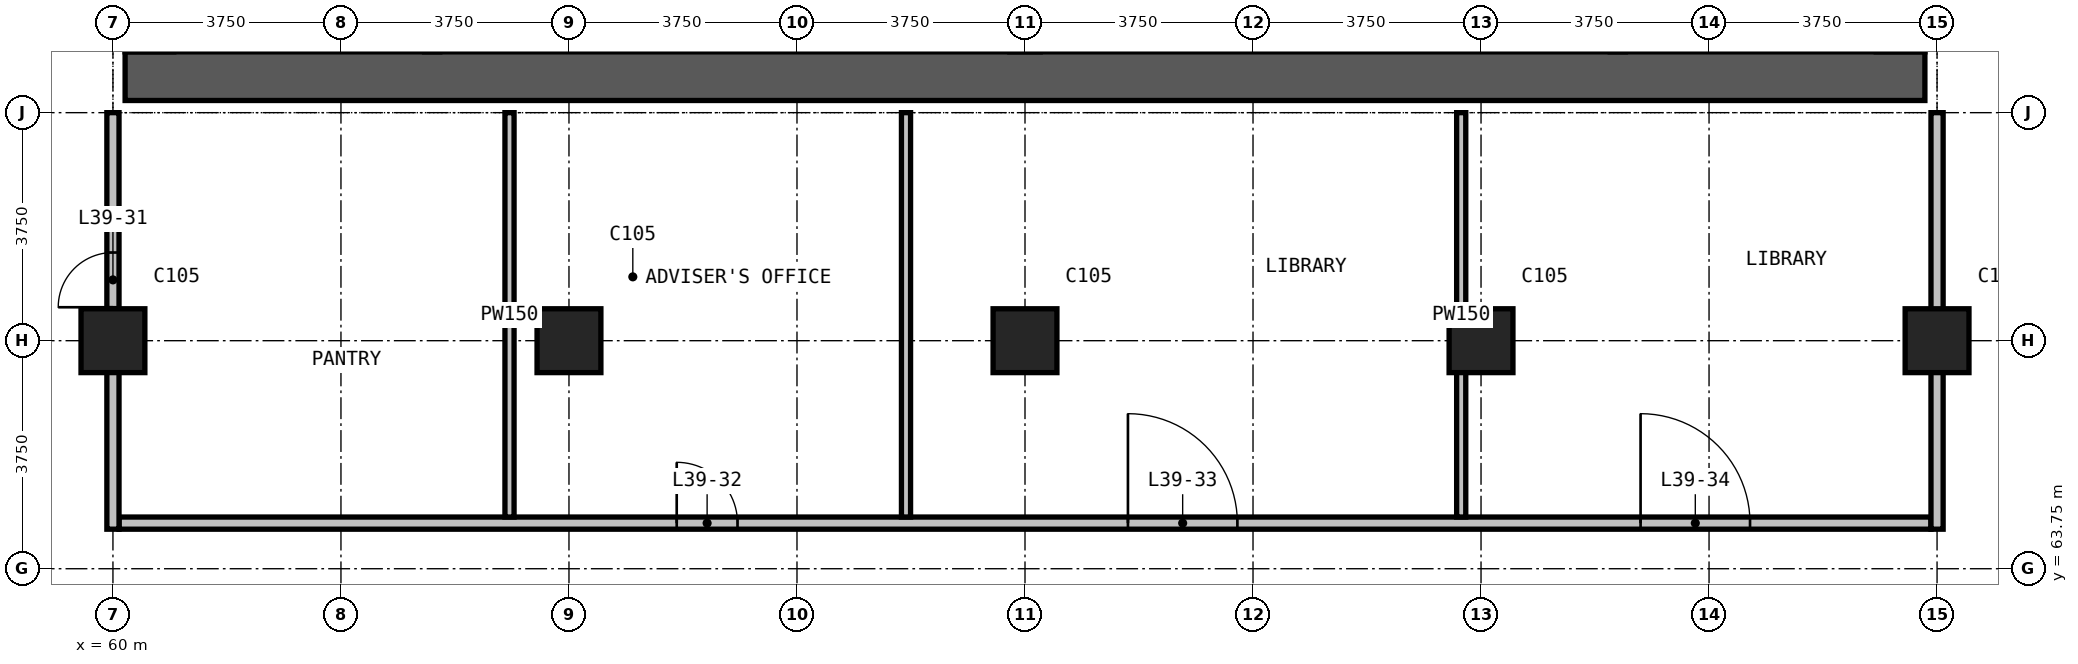
"""IFC4 building model, lengths in metres.
Left out: names, types, materials, properties, quantities, classifications, styles, units other than length and angle.
Written with IfcOpenShell. Run it as: python <this file> out.ifc"""

import sys

from ifc_helpers import new_model, si_unit, direction, frame, frame_2d, origin, origin_2d, place, context, subcontext, project, spatial, rectangle, extrude, element, fill, save


model = new_model("IFC4")
c1 = context("Model", 3, precision=1e-05, world=origin(), true_north=direction((0.0, 1.0)))
c2 = subcontext(c1, "Body", "Model", "MODEL_VIEW")
j1 = project(units=[si_unit("LENGTHUNIT", "METRE"), si_unit("PLANEANGLEUNIT", "RADIAN")], contexts=[c1])
p1 = place(None, origin())
s1 = spatial("IfcSite", under=j1, at=p1, CompositionType="ELEMENT")
p2 = place(p1, origin())
s2 = spatial("IfcBuilding", under=s1, at=p2, CompositionType="ELEMENT")
p3 = place(p2, frame((0.0, 0.0, 154.9)))
s3 = spatial("IfcBuildingStorey", under=s2, at=p3, CompositionType="ELEMENT", Elevation=154.9)
for number, where, z_axis, x_axis in (
    (1, (60.0, 67.5, 0.0), (0.0, 0.0, 1.0), (1.0, 0.0, 0.0)),
    (2, (67.5, 67.5, 0.0), (0.0, 0.0, 1.0), (1.0, 0.0, 0.0)),
    (3, (75.0, 67.5, 0.0), (0.0, 0.0, 1.0), (1.0, 0.0, 0.0)),
    (4, (82.5, 67.5, 0.0), (0.0, 0.0, 1.0), (1.0, 0.0, 0.0)),
    (5, (90.0, 67.5, 0.0), (0.0, 0.0, 1.0), (1.0, 0.0, 0.0)),
):
    element("IfcColumn", number, at=place(p3, frame(where, z_axis=z_axis, x_axis=x_axis)), inside=s3, PredefinedType="COLUMN", context=c2, shape_type="SweptSolid", body=[
        extrude(rectangle(XDim=1.05, YDim=1.05, at=origin_2d()), origin(), (0.0, 0.0, 1.0), 3.6),
    ])
p4 = place(p3, frame((60.2, 71.85, 0.0), z_axis=(0.0, 0.0, 1.0), x_axis=(1.0, 0.0, 0.0)))
e6 = element("IfcWall", 6, at=p4, inside=s3, PredefinedType="SHEAR", context=c2, shape_type="SweptSolid", body=[
    extrude(rectangle(XDim=29.6, YDim=0.8, at=frame_2d((14.8, 0.0))), origin(), (0.0, 0.0, 1.0), 3.6),
])
p5 = place(p3, frame((60.1, 64.5, 0.0), z_axis=(0.0, 0.0, 1.0), x_axis=(1.0, 0.0, 0.0)))
e7 = element("IfcWall", 7, at=p5, inside=s3, PredefinedType="PARTITIONING", context=c2, shape_type="SweptSolid", body=[
    extrude(rectangle(XDim=29.8, YDim=0.2, at=frame_2d((14.9, 0.0))), origin(), (0.0, 0.0, 1.0), 3.3),
])
p6 = place(p5, frame((9.172, 0.0, 0.0)))
e8 = element("IfcOpeningElement", 8, at=p6, cuts=e7, PredefinedType="OPENING", context=c2, shape_type="SweptSolid", body=[
    extrude(rectangle(XDim=1.0, YDim=2.2, at=frame_2d((0.5, 1.1))), frame((0.0, 0.11, 0.0), z_axis=(0.0, -1.0, 0.0), x_axis=(1.0, 0.0, 0.0)), (0.0, 0.0, 1.0), 0.22),
])
p7 = place(p5, frame((16.593, 0.0, 0.0)))
e9 = element("IfcOpeningElement", 9, at=p7, cuts=e7, PredefinedType="OPENING", context=c2, shape_type="SweptSolid", body=[
    extrude(rectangle(XDim=1.8, YDim=2.2, at=frame_2d((0.9, 1.1))), frame((0.0, 0.11, 0.0), z_axis=(0.0, -1.0, 0.0), x_axis=(1.0, 0.0, 0.0)), (0.0, 0.0, 1.0), 0.22),
])
p8 = place(p5, frame((25.024, 0.0, 0.0)))
e10 = element("IfcOpeningElement", 10, at=p8, cuts=e7, PredefinedType="OPENING", context=c2, shape_type="SweptSolid", body=[
    extrude(rectangle(XDim=1.8, YDim=2.2, at=frame_2d((0.9, 1.1))), frame((0.0, 0.11, 0.0), z_axis=(0.0, -1.0, 0.0), x_axis=(1.0, 0.0, 0.0)), (0.0, 0.0, 1.0), 0.22),
])
p9 = place(p3, frame((60.0, 64.4, 0.0), z_axis=(0.0, 0.0, 1.0), x_axis=(0.0, 1.0, 0.0)))
e11 = element("IfcWall", 11, at=p9, inside=s3, PredefinedType="PARTITIONING", context=c2, shape_type="SweptSolid", body=[
    extrude(rectangle(XDim=6.85, YDim=0.2, at=frame_2d((3.425, 0.0))), origin(), (0.0, 0.0, 1.0), 3.3),
])
p10 = place(p9, frame((3.65, 0.0, 0.0)))
e12 = element("IfcOpeningElement", 12, at=p10, cuts=e11, PredefinedType="OPENING", context=c2, shape_type="SweptSolid", body=[
    extrude(rectangle(XDim=0.9, YDim=2.2, at=frame_2d((0.45, 1.1))), frame((0.0, 0.11, 0.0), z_axis=(0.0, -1.0, 0.0), x_axis=(1.0, 0.0, 0.0)), (0.0, 0.0, 1.0), 0.22),
])
p11 = place(p3, frame((90.0, 64.4, 0.0), z_axis=(0.0, 0.0, 1.0), x_axis=(0.0, 1.0, 0.0)))
e13 = element("IfcWall", 13, at=p11, inside=s3, PredefinedType="PARTITIONING", context=c2, shape_type="SweptSolid", body=[
    extrude(rectangle(XDim=6.85, YDim=0.2, at=frame_2d((3.425, 0.0))), origin(), (0.0, 0.0, 1.0), 3.3),
])
for number, where, z_axis, x_axis in (
    (14, (66.522, 64.6, 0.0), (0.0, 0.0, 1.0), (0.0, 1.0, 0.0)),
    (15, (73.043, 64.6, 0.0), (0.0, 0.0, 1.0), (0.0, 1.0, 0.0)),
    (16, (82.174, 64.6, 0.0), (0.0, 0.0, 1.0), (0.0, 1.0, 0.0)),
):
    element("IfcWall", number, at=place(p3, frame(where, z_axis=z_axis, x_axis=x_axis)), inside=s3, PredefinedType="PARTITIONING", context=c2, shape_type="SweptSolid", body=[
        extrude(rectangle(XDim=6.65, YDim=0.15, at=frame_2d((3.325, 0.0))), origin(), (0.0, 0.0, 1.0), 3.3),
    ])
p12 = place(p10, origin())
e17 = element("IfcDoor", 17, at=p12, inside=s3, OperationType="SINGLE_SWING_LEFT", PredefinedType="DOOR", context=c2, shape_type="SweptSolid", body=[
    extrude(rectangle(XDim=0.9, YDim=2.2, at=frame_2d((0.45, 1.1))), frame((0.0, 0.025, 0.0), z_axis=(0.0, -1.0, 0.0), x_axis=(1.0, 0.0, 0.0)), (0.0, 0.0, 1.0), 0.05),
])
fill(e12, e17)
p13 = place(p6, origin())
e18 = element("IfcDoor", 18, at=p13, inside=s3, OperationType="SINGLE_SWING_LEFT", PredefinedType="DOOR", context=c2, shape_type="SweptSolid", body=[
    extrude(rectangle(XDim=1.0, YDim=2.2, at=frame_2d((0.5, 1.1))), frame((0.0, 0.025, 0.0), z_axis=(0.0, -1.0, 0.0), x_axis=(1.0, 0.0, 0.0)), (0.0, 0.0, 1.0), 0.05),
])
fill(e8, e18)
p14 = place(p7, origin())
e19 = element("IfcDoor", 19, at=p14, inside=s3, OperationType="DOUBLE_DOOR_SINGLE_SWING", PredefinedType="DOOR", context=c2, shape_type="SweptSolid", body=[
    extrude(rectangle(XDim=1.8, YDim=2.2, at=frame_2d((0.9, 1.1))), frame((0.0, 0.025, 0.0), z_axis=(0.0, -1.0, 0.0), x_axis=(1.0, 0.0, 0.0)), (0.0, 0.0, 1.0), 0.05),
])
fill(e9, e19)
p15 = place(p8, origin())
e20 = element("IfcDoor", 20, at=p15, inside=s3, OperationType="DOUBLE_DOOR_SINGLE_SWING", PredefinedType="DOOR", context=c2, shape_type="SweptSolid", body=[
    extrude(rectangle(XDim=1.8, YDim=2.2, at=frame_2d((0.9, 1.1))), frame((0.0, 0.025, 0.0), z_axis=(0.0, -1.0, 0.0), x_axis=(1.0, 0.0, 0.0)), (0.0, 0.0, 1.0), 0.05),
])
fill(e10, e20)
save(model, sys.argv[1])
